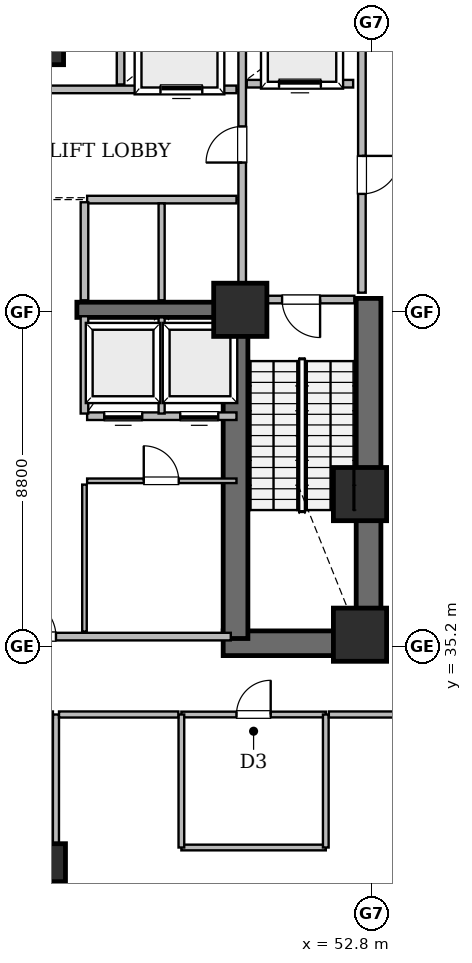
"""IFC4 building model, lengths in metres.
Left out: names, types, materials, properties, quantities, classifications, styles, units other than length and angle.
Written with IfcOpenShell. Run it as: python <this file> out.ifc"""

import sys

from ifc_helpers import new_model, si_unit, direction, frame, frame_2d, origin, origin_2d, place, context, subcontext, project, spatial, rectangle, extrude, element, fill, save


model = new_model("IFC4")
c1 = context("Model", 3, precision=1e-05, world=origin(), true_north=direction((0.0, 1.0)))
c2 = subcontext(c1, "Body", "Model", "MODEL_VIEW")
j1 = project(units=[si_unit("LENGTHUNIT", "METRE"), si_unit("PLANEANGLEUNIT", "RADIAN")], contexts=[c1])
p1 = place(None, origin())
s1 = spatial("IfcSite", under=j1, at=p1, CompositionType="ELEMENT")
p2 = place(p1, origin())
s2 = spatial("IfcBuilding", under=s1, at=p2, CompositionType="ELEMENT")
p3 = place(p2, frame((0.0, 0.0, 24.0)))
s3 = spatial("IfcBuildingStorey", under=s2, at=p3, CompositionType="ELEMENT", Elevation=24.0)
p4 = place(p3, frame((48.9, 35.275, 0.0), z_axis=(0.0, 0.0, 1.0), x_axis=(1.0, 0.0, 0.0)))
e1 = element("IfcWall", 1, at=p4, inside=s3, PredefinedType="SHEAR", context=c2, shape_type="SweptSolid", body=[
    extrude(rectangle(XDim=4.15, YDim=0.65, at=frame_2d((2.075, 0.0))), origin(), (0.0, 0.0, 1.0), 4.925),
])
p5 = place(p3, frame((52.725, 34.95, 0.0), z_axis=(0.0, 0.0, 1.0), x_axis=(0.0, 1.0, 0.0)))
e2 = element("IfcWall", 2, at=p5, inside=s3, PredefinedType="SHEAR", context=c2, shape_type="SweptSolid", body=[
    extrude(rectangle(XDim=9.4, YDim=0.65, at=frame_2d((4.7, 0.0))), origin(), (0.0, 0.0, 1.0), 4.925),
])
p6 = place(p3, frame((49.225, 35.4, 0.0), z_axis=(0.0, 0.0, 1.0), x_axis=(0.0, 1.0, 0.0)))
e3 = element("IfcWall", 3, at=p6, inside=s3, PredefinedType="SHEAR", context=c2, shape_type="SweptSolid", body=[
    extrude(rectangle(XDim=8.95, YDim=0.65, at=frame_2d((4.475, 0.0))), origin(), (0.0, 0.0, 1.0), 4.925),
])
p7 = place(p3, frame((45.05, 44.05, 0.0), z_axis=(0.0, 0.0, 1.0), x_axis=(1.0, 0.0, 0.0)))
e4 = element("IfcWall", 4, at=p7, inside=s3, PredefinedType="SHEAR", context=c2, shape_type="SweptSolid", body=[
    extrude(rectangle(XDim=4.2, YDim=0.4, at=frame_2d((2.1, 0.0))), origin(), (0.0, 0.0, 1.0), 4.925),
])
for number, where, z_axis, x_axis in (
    (5, (52.5, 35.5, 0.0), (0.0, 0.0, 1.0), (1.0, 0.0, 0.0)),
    (6, (52.5, 39.2, 0.0), (0.0, 0.0, 1.0), (1.0, 0.0, 0.0)),
    (7, (49.35, 44.05, 0.0), (0.0, 0.0, 1.0), (1.0, 0.0, 0.0)),
    (8, (44.0, 51.2, 0.0), (0.0, 0.0, 1.0), (1.0, 0.0, 0.0)),
):
    element("IfcColumn", number, at=place(p3, frame(where, z_axis=z_axis, x_axis=x_axis)), inside=s3, PredefinedType="COLUMN", context=c2, shape_type="SweptSolid", body=[
        extrude(rectangle(XDim=1.4, YDim=1.4, at=origin_2d()), origin(), (0.0, 0.0, 1.0), 5.2),
    ])
p8 = place(p3, frame((44.0, 29.5, 0.0), z_axis=(0.0, 0.0, 1.0), x_axis=(1.0, 0.0, 0.0)))
e9 = element("IfcColumn", 9, at=p8, inside=s3, PredefinedType="COLUMN", context=c2, shape_type="SweptSolid", body=[
    extrude(rectangle(XDim=1.5, YDim=1.0, at=origin_2d()), origin(), (0.0, 0.0, 1.0), 5.2),
])
p9 = place(p3, frame((38.9, 35.45, 0.0), z_axis=(0.0, 0.0, 1.0), x_axis=(1.0, 0.0, 0.0)))
e10 = element("IfcWall", 10, at=p9, inside=s3, PredefinedType="SOLIDWALL", context=c2, shape_type="SweptSolid", body=[
    extrude(rectangle(XDim=10.2, YDim=0.2, at=frame_2d((5.1, 0.0))), origin(), (0.0, 0.0, 1.0), 4.925),
])
p10 = place(p9, frame((4.6, 0.0, 0.0)))
e11 = element("IfcOpeningElement", 11, at=p10, cuts=e10, PredefinedType="OPENING", context=c2, shape_type="SweptSolid", body=[
    extrude(rectangle(XDim=1.0, YDim=2.15, at=frame_2d((0.5, 1.075))), frame((0.0, 0.11, 0.0), z_axis=(0.0, -1.0, 0.0), x_axis=(1.0, 0.0, 0.0)), (0.0, 0.0, 1.0), 0.22),
])
p11 = place(p3, frame((52.55, 44.5, 0.0), z_axis=(0.0, 0.0, 1.0), x_axis=(0.0, 1.0, 0.0)))
e12 = element("IfcWall", 12, at=p11, inside=s3, PredefinedType="SOLIDWALL", context=c2, shape_type="SweptSolid", body=[
    extrude(rectangle(XDim=7.92, YDim=0.2, at=frame_2d((3.96, 0.0))), origin(), (0.0, 0.0, 1.0), 4.925),
])
p12 = place(p11, frame((2.6, 0.0, 0.0)))
e13 = element("IfcOpeningElement", 13, at=p12, cuts=e12, PredefinedType="OPENING", context=c2, shape_type="SweptSolid", body=[
    extrude(rectangle(XDim=1.0, YDim=2.15, at=frame_2d((0.5, 1.075))), frame((0.0, 0.11, 0.0), z_axis=(0.0, -1.0, 0.0), x_axis=(1.0, 0.0, 0.0)), (0.0, 0.0, 1.0), 0.22),
])
p13 = place(p3, frame((49.4, 44.5, 0.0), z_axis=(0.0, 0.0, 1.0), x_axis=(0.0, 1.0, 0.0)))
e14 = element("IfcWall", 14, at=p13, inside=s3, PredefinedType="SOLIDWALL", context=c2, shape_type="SweptSolid", body=[
    extrude(rectangle(XDim=7.92, YDim=0.2, at=frame_2d((3.96, 0.0))), origin(), (0.0, 0.0, 1.0), 4.013),
])
p14 = place(p13, frame((3.425, 0.0, 0.0)))
e15 = element("IfcOpeningElement", 15, at=p14, cuts=e14, PredefinedType="OPENING", context=c2, shape_type="SweptSolid", body=[
    extrude(rectangle(XDim=0.95, YDim=2.15, at=frame_2d((0.475, 1.075))), frame((0.0, 0.11, 0.0), z_axis=(0.0, -1.0, 0.0), x_axis=(1.0, 0.0, 0.0)), (0.0, 0.0, 1.0), 0.22),
])
p15 = place(p3, frame((43.75, 49.85, 0.0), z_axis=(0.0, 0.0, 1.0), x_axis=(1.0, 0.0, 0.0)))
e16 = element("IfcWall", 16, at=p15, inside=s3, PredefinedType="SOLIDWALL", context=c2, shape_type="SweptSolid", body=[
    extrude(rectangle(XDim=5.5, YDim=0.2, at=frame_2d((2.75, 0.0))), origin(), (0.0, 0.0, 1.0), 4.013),
])
p16 = place(p15, frame((3.5, 0.0, 0.0)))
e17 = element("IfcOpeningElement", 17, at=p16, cuts=e16, PredefinedType="OPENING", context=c2, shape_type="SweptSolid", body=[
    extrude(rectangle(XDim=1.1, YDim=2.15, at=frame_2d((0.55, 1.075))), frame((0.0, 0.11, 0.0), z_axis=(0.0, -1.0, 0.0), x_axis=(1.0, 0.0, 0.0)), (0.0, 0.0, 1.0), 0.22),
])
p17 = place(p3, frame((45.32, 41.25, 0.0), z_axis=(0.0, 0.0, 1.0), x_axis=(1.0, 0.0, 0.0)))
e18 = element("IfcWall", 18, at=p17, inside=s3, PredefinedType="SOLIDWALL", context=c2, shape_type="SweptSolid", body=[
    extrude(rectangle(XDim=3.93, YDim=0.2, at=frame_2d((1.965, 0.0))), origin(), (0.0, 0.0, 1.0), 4.925),
])
p18 = place(p17, frame((0.45, 0.0, 0.0)))
e19 = element("IfcOpeningElement", 19, at=p18, cuts=e18, PredefinedType="OPENING", context=c2, shape_type="SweptSolid", body=[
    extrude(rectangle(XDim=1.0, YDim=2.15, at=frame_2d((0.5, 1.075))), frame((0.0, 0.11, 0.0), z_axis=(0.0, -1.0, 0.0), x_axis=(1.0, 0.0, 0.0)), (0.0, 0.0, 1.0), 0.22),
])
p19 = place(p17, frame((2.45, 0.0, 0.0)))
e20 = element("IfcOpeningElement", 20, at=p19, cuts=e18, PredefinedType="OPENING", context=c2, shape_type="SweptSolid", body=[
    extrude(rectangle(XDim=1.0, YDim=2.15, at=frame_2d((0.5, 1.075))), frame((0.0, 0.11, 0.0), z_axis=(0.0, -1.0, 0.0), x_axis=(1.0, 0.0, 0.0)), (0.0, 0.0, 1.0), 0.22),
])
p20 = place(p3, frame((45.32, 39.55, 0.0), z_axis=(0.0, 0.0, 1.0), x_axis=(1.0, 0.0, 0.0)))
e21 = element("IfcWall", 21, at=p20, inside=s3, PredefinedType="PARTITIONING", context=c2, shape_type="SweptSolid", body=[
    extrude(rectangle(XDim=3.93, YDim=0.12, at=frame_2d((1.965, 0.0))), origin(), (0.0, 0.0, 1.0), 4.925),
])
p21 = place(p20, frame((1.49, 0.0, 0.0)))
e22 = element("IfcOpeningElement", 22, at=p21, cuts=e21, PredefinedType="OPENING", context=c2, shape_type="SweptSolid", body=[
    extrude(rectangle(XDim=0.92, YDim=2.1, at=frame_2d((0.46, 1.05))), frame((0.0, 0.07, 0.0), z_axis=(0.0, -1.0, 0.0), x_axis=(1.0, 0.0, 0.0)), (0.0, 0.0, 1.0), 0.14),
])
p22 = place(p3, frame((47.8, 33.4, 0.0), z_axis=(0.0, 0.0, 1.0), x_axis=(1.0, 0.0, 0.0)))
e23 = element("IfcWall", 23, at=p22, inside=s3, PredefinedType="PLUMBINGWALL", context=c2, shape_type="SweptSolid", body=[
    extrude(rectangle(XDim=3.8, YDim=0.15, at=frame_2d((1.9, 0.0))), origin(), (0.0, 0.0, 1.0), 4.263),
])
p23 = place(p22, frame((1.45, 0.0, 0.0)))
e24 = element("IfcOpeningElement", 24, at=p23, cuts=e23, PredefinedType="OPENING", context=c2, shape_type="SweptSolid", body=[
    extrude(rectangle(XDim=0.9, YDim=2.1, at=frame_2d((0.45, 1.05))), frame((0.0, 0.085, 0.0), z_axis=(0.0, -1.0, 0.0), x_axis=(1.0, 0.0, 0.0)), (0.0, 0.0, 1.0), 0.17),
])
p24 = place(p3, frame((49.55, 44.32, 0.0), z_axis=(0.0, 0.0, 1.0), x_axis=(1.0, 0.0, 0.0)))
e25 = element("IfcWall", 25, at=p24, inside=s3, PredefinedType="SOLIDWALL", context=c2, shape_type="SweptSolid", body=[
    extrude(rectangle(XDim=2.8, YDim=0.2, at=frame_2d((1.4, 0.0))), origin(), (0.0, 0.0, 1.0), 4.013),
])
p25 = place(p24, frame((0.9, 0.0, 0.0)))
e26 = element("IfcOpeningElement", 26, at=p25, cuts=e25, PredefinedType="OPENING", context=c2, shape_type="SweptSolid", body=[
    extrude(rectangle(XDim=1.0, YDim=2.15, at=frame_2d((0.5, 1.075))), frame((0.0, 0.11, 0.0), z_axis=(0.0, -1.0, 0.0), x_axis=(1.0, 0.0, 0.0)), (0.0, 0.0, 1.0), 0.22),
])
p26 = place(p3, frame((49.52, 50.0, 0.0), z_axis=(0.0, 0.0, 1.0), x_axis=(1.0, 0.0, 0.0)))
e27 = element("IfcWall", 27, at=p26, inside=s3, PredefinedType="SOLIDWALL", context=c2, shape_type="SweptSolid", body=[
    extrude(rectangle(XDim=2.8, YDim=0.2, at=frame_2d((1.4, 0.0))), origin(), (0.0, 0.0, 1.0), 4.925),
])
p27 = place(p26, frame((0.85, 0.0, 0.0)))
e28 = element("IfcOpeningElement", 28, at=p27, cuts=e27, PredefinedType="OPENING", context=c2, shape_type="SweptSolid", body=[
    extrude(rectangle(XDim=1.1, YDim=2.15, at=frame_2d((0.55, 1.075))), frame((0.0, 0.11, 0.0), z_axis=(0.0, -1.0, 0.0), x_axis=(1.0, 0.0, 0.0)), (0.0, 0.0, 1.0), 0.22),
])
p28 = place(p3, frame((44.496, 18.248, 0.0), z_axis=(0.0, 0.0, 1.0), x_axis=(0.000257806701, 0.999999966768, 0.0)))
e29 = element("IfcWall", 29, at=p28, inside=s3, PredefinedType="SOLIDWALL", context=c2, shape_type="SweptSolid", body=[
    extrude(rectangle(XDim=15.152, YDim=0.16, at=frame_2d((7.576, 0.0))), origin(), (0.0, 0.0, 1.0), 2.913),
])
p29 = place(p3, frame((40.08, 33.4, 0.0), z_axis=(0.0, 0.0, 1.0), x_axis=(1.0, 0.0, 0.0)))
e30 = element("IfcWall", 30, at=p29, inside=s3, PredefinedType="SOLIDWALL", context=c2, shape_type="SweptSolid", body=[
    extrude(rectangle(XDim=4.34, YDim=0.16, at=frame_2d((2.17, 0.0))), origin(), (0.0, 0.0, 1.0), 4.925),
])
p30 = place(p3, frame((45.32, 46.95, 0.0), z_axis=(0.0, 0.0, 1.0), x_axis=(1.0, 0.0, 0.0)))
e31 = element("IfcWall", 31, at=p30, inside=s3, PredefinedType="SOLIDWALL", context=c2, shape_type="SweptSolid", body=[
    extrude(rectangle(XDim=3.93, YDim=0.2, at=frame_2d((1.965, 0.0))), origin(), (0.0, 0.0, 1.0), 4.013),
])
p31 = place(p3, frame((45.25, 35.58, 0.0), z_axis=(0.0, 0.0, 1.0), x_axis=(0.0, 1.0, 0.0)))
e32 = element("IfcWall", 32, at=p31, inside=s3, PredefinedType="PARTITIONING", context=c2, shape_type="SweptSolid", body=[
    extrude(rectangle(XDim=3.87, YDim=0.12, at=frame_2d((1.935, 0.0))), origin(), (0.0, 0.0, 1.0), 4.925),
])
p32 = place(p3, frame((47.8, 29.9, 0.0), z_axis=(0.0, 0.0, 1.0), x_axis=(1.0, 0.0, 0.0)))
e33 = element("IfcWall", 33, at=p32, inside=s3, PredefinedType="PLUMBINGWALL", context=c2, shape_type="SweptSolid", body=[
    extrude(rectangle(XDim=3.8, YDim=0.15, at=frame_2d((1.9, 0.0))), origin(), (0.0, 0.0, 1.0), 4.925),
])
for number, where, z_axis, x_axis in (
    (34, (47.8, 33.4, 0.0), (0.0, 0.0, 1.0), (0.0, -1.0, 0.0)),
    (35, (51.6, 29.9, 0.0), (0.0, 0.0, 1.0), (0.0, 1.0, 0.0)),
):
    element("IfcWall", number, at=place(p3, frame(where, z_axis=z_axis, x_axis=x_axis)), inside=s3, PredefinedType="PLUMBINGWALL", context=c2, shape_type="SweptSolid", body=[
        extrude(rectangle(XDim=3.5, YDim=0.15, at=frame_2d((1.75, 0.0))), origin(), (0.0, 0.0, 1.0), 4.263),
    ])
p33 = place(p3, frame((44.58, 33.4, 0.0), z_axis=(0.0, 0.0, 1.0), x_axis=(1.0, 0.0, 0.0)))
e36 = element("IfcWall", 36, at=p33, inside=s3, PredefinedType="SOLIDWALL", context=c2, shape_type="SweptSolid", body=[
    extrude(rectangle(XDim=3.14, YDim=0.16, at=frame_2d((1.57, 0.0))), origin(), (0.0, 0.0, 1.0), 4.925),
])
p34 = place(p3, frame((51.68, 33.4, 0.0), z_axis=(0.0, 0.0, 1.0), x_axis=(1.0, 0.0, 0.0)))
e37 = element("IfcWall", 37, at=p34, inside=s3, PredefinedType="SOLIDWALL", context=c2, shape_type="SweptSolid", body=[
    extrude(rectangle(XDim=2.84, YDim=0.16, at=frame_2d((1.42, 0.0))), origin(), (0.0, 0.0, 1.0), 4.263),
])
p35 = place(p3, frame((45.25, 44.3, 0.0), z_axis=(0.0, 0.0, 1.0), x_axis=(0.0, 1.0, 0.0)))
e38 = element("IfcWall", 38, at=p35, inside=s3, PredefinedType="SOLIDWALL", context=c2, shape_type="SweptSolid", body=[
    extrude(rectangle(XDim=2.58, YDim=0.2, at=frame_2d((1.29, 0.0))), origin(), (0.0, 0.0, 1.0), 4.925),
])
p36 = place(p3, frame((45.25, 41.32, 0.0), z_axis=(0.0, 0.0, 1.0), x_axis=(0.0, 1.0, 0.0)))
e39 = element("IfcWall", 39, at=p36, inside=s3, PredefinedType="SOLIDWALL", context=c2, shape_type="SweptSolid", body=[
    extrude(rectangle(XDim=2.56, YDim=0.2, at=frame_2d((1.28, 0.0))), origin(), (0.0, 0.0, 1.0), 4.925),
])
p37 = place(p3, frame((47.28, 44.3, 0.0), z_axis=(0.0, 0.0, 1.0), x_axis=(0.0, 1.0, 0.0)))
e40 = element("IfcWall", 40, at=p37, inside=s3, PredefinedType="SOLIDWALL", context=c2, shape_type="SweptSolid", body=[
    extrude(rectangle(XDim=2.55, YDim=0.16, at=frame_2d((1.275, 0.0))), origin(), (0.0, 0.0, 1.0), 4.013),
])
p38 = place(p3, frame((47.28, 41.32, 0.0), z_axis=(0.0, 0.0, 1.0), x_axis=(0.0, 1.0, 0.0)))
e41 = element("IfcWall", 41, at=p38, inside=s3, PredefinedType="SOLIDWALL", context=c2, shape_type="SweptSolid", body=[
    extrude(rectangle(XDim=2.53, YDim=0.16, at=frame_2d((1.265, 0.0))), origin(), (0.0, 0.0, 1.0), 4.925),
])
p39 = place(p3, frame((46.2, 49.98, 0.0), z_axis=(0.0, 0.0, 1.0), x_axis=(0.0, 1.0, 0.0)))
e42 = element("IfcWall", 42, at=p39, inside=s3, PredefinedType="SOLIDWALL", context=c2, shape_type="SweptSolid", body=[
    extrude(rectangle(XDim=2.37, YDim=0.2, at=frame_2d((1.185, 0.0))), origin(), (0.0, 0.0, 1.0), 4.925),
])
p40 = place(p25, frame((1.0, 0.0, 0.0), z_axis=(0.0, 0.0, 1.0), x_axis=(-1.0, 0.0, 0.0)))
e43 = element("IfcDoor", 43, at=p40, inside=s3, OperationType="SINGLE_SWING_RIGHT", PredefinedType="DOOR", context=c2, shape_type="SweptSolid", body=[
    extrude(rectangle(XDim=1.0, YDim=2.15, at=frame_2d((0.5, 1.075))), frame((0.0, 0.025, 0.0), z_axis=(0.0, -1.0, 0.0), x_axis=(1.0, 0.0, 0.0)), (0.0, 0.0, 1.0), 0.05),
])
fill(e26, e43)
p41 = place(p12, frame((1.0, 0.0, 0.0), z_axis=(0.0, 0.0, 1.0), x_axis=(-1.0, 0.0, 0.0)))
e44 = element("IfcDoor", 44, at=p41, inside=s3, OperationType="SINGLE_SWING_RIGHT", PredefinedType="DOOR", context=c2, shape_type="SweptSolid", body=[
    extrude(rectangle(XDim=1.0, YDim=2.15, at=frame_2d((0.5, 1.075))), frame((0.0, 0.025, 0.0), z_axis=(0.0, -1.0, 0.0), x_axis=(1.0, 0.0, 0.0)), (0.0, 0.0, 1.0), 0.05),
])
fill(e13, e44)
p42 = place(p14, origin())
e45 = element("IfcDoor", 45, at=p42, inside=s3, OperationType="SINGLE_SWING_LEFT", PredefinedType="DOOR", context=c2, shape_type="SweptSolid", body=[
    extrude(rectangle(XDim=0.95, YDim=2.15, at=frame_2d((0.475, 1.075))), frame((0.0, 0.025, 0.0), z_axis=(0.0, -1.0, 0.0), x_axis=(1.0, 0.0, 0.0)), (0.0, 0.0, 1.0), 0.05),
])
fill(e15, e45)
p43 = place(p27, origin())
e46 = element("IfcDoor", 46, at=p43, inside=s3, OperationType="SLIDING_TO_LEFT", PredefinedType="DOOR", context=c2, shape_type="SweptSolid", body=[
    extrude(rectangle(XDim=1.1, YDim=2.15, at=frame_2d((0.55, 1.075))), frame((0.0, 0.025, 0.0), z_axis=(0.0, -1.0, 0.0), x_axis=(1.0, 0.0, 0.0)), (0.0, 0.0, 1.0), 0.05),
])
fill(e28, e46)
p44 = place(p10, origin())
e47 = element("IfcDoor", 47, at=p44, inside=s3, OperationType="SINGLE_SWING_LEFT", PredefinedType="DOOR", context=c2, shape_type="SweptSolid", body=[
    extrude(rectangle(XDim=1.0, YDim=2.15, at=frame_2d((0.5, 1.075))), frame((0.0, 0.025, 0.0), z_axis=(0.0, -1.0, 0.0), x_axis=(1.0, 0.0, 0.0)), (0.0, 0.0, 1.0), 0.05),
])
fill(e11, e47)
p45 = place(p16, origin())
e48 = element("IfcDoor", 48, at=p45, inside=s3, OperationType="SLIDING_TO_LEFT", PredefinedType="DOOR", context=c2, shape_type="SweptSolid", body=[
    extrude(rectangle(XDim=1.1, YDim=2.15, at=frame_2d((0.55, 1.075))), frame((0.0, 0.025, 0.0), z_axis=(0.0, -1.0, 0.0), x_axis=(1.0, 0.0, 0.0)), (0.0, 0.0, 1.0), 0.05),
])
fill(e17, e48)
p46 = place(p18, frame((1.0, 0.0, 0.0), z_axis=(0.0, 0.0, 1.0), x_axis=(-1.0, 0.0, 0.0)))
e49 = element("IfcDoor", 49, at=p46, inside=s3, OperationType="SLIDING_TO_LEFT", PredefinedType="DOOR", context=c2, shape_type="SweptSolid", body=[
    extrude(rectangle(XDim=1.0, YDim=2.15, at=frame_2d((0.5, 1.075))), frame((0.0, 0.025, 0.0), z_axis=(0.0, -1.0, 0.0), x_axis=(1.0, 0.0, 0.0)), (0.0, 0.0, 1.0), 0.05),
])
fill(e19, e49)
p47 = place(p19, frame((1.0, 0.0, 0.0), z_axis=(0.0, 0.0, 1.0), x_axis=(-1.0, 0.0, 0.0)))
e50 = element("IfcDoor", 50, at=p47, inside=s3, OperationType="SLIDING_TO_LEFT", PredefinedType="DOOR", context=c2, shape_type="SweptSolid", body=[
    extrude(rectangle(XDim=1.0, YDim=2.15, at=frame_2d((0.5, 1.075))), frame((0.0, 0.025, 0.0), z_axis=(0.0, -1.0, 0.0), x_axis=(1.0, 0.0, 0.0)), (0.0, 0.0, 1.0), 0.05),
])
fill(e20, e50)
p48 = place(p21, origin())
e51 = element("IfcDoor", 51, at=p48, inside=s3, OperationType="SINGLE_SWING_LEFT", PredefinedType="DOOR", context=c2, shape_type="SweptSolid", body=[
    extrude(rectangle(XDim=0.92, YDim=2.1, at=frame_2d((0.46, 1.05))), frame((0.0, 0.025, 0.0), z_axis=(0.0, -1.0, 0.0), x_axis=(1.0, 0.0, 0.0)), (0.0, 0.0, 1.0), 0.05),
])
fill(e22, e51)
p49 = place(p23, origin())
e52 = element("IfcDoor", 52, at=p49, inside=s3, OperationType="SINGLE_SWING_RIGHT", PredefinedType="DOOR", context=c2, shape_type="SweptSolid", body=[
    extrude(rectangle(XDim=0.9, YDim=2.1, at=frame_2d((0.45, 1.05))), frame((0.0, 0.025, 0.0), z_axis=(0.0, -1.0, 0.0), x_axis=(1.0, 0.0, 0.0)), (0.0, 0.0, 1.0), 0.05),
])
fill(e24, e52)
save(model, sys.argv[1])
